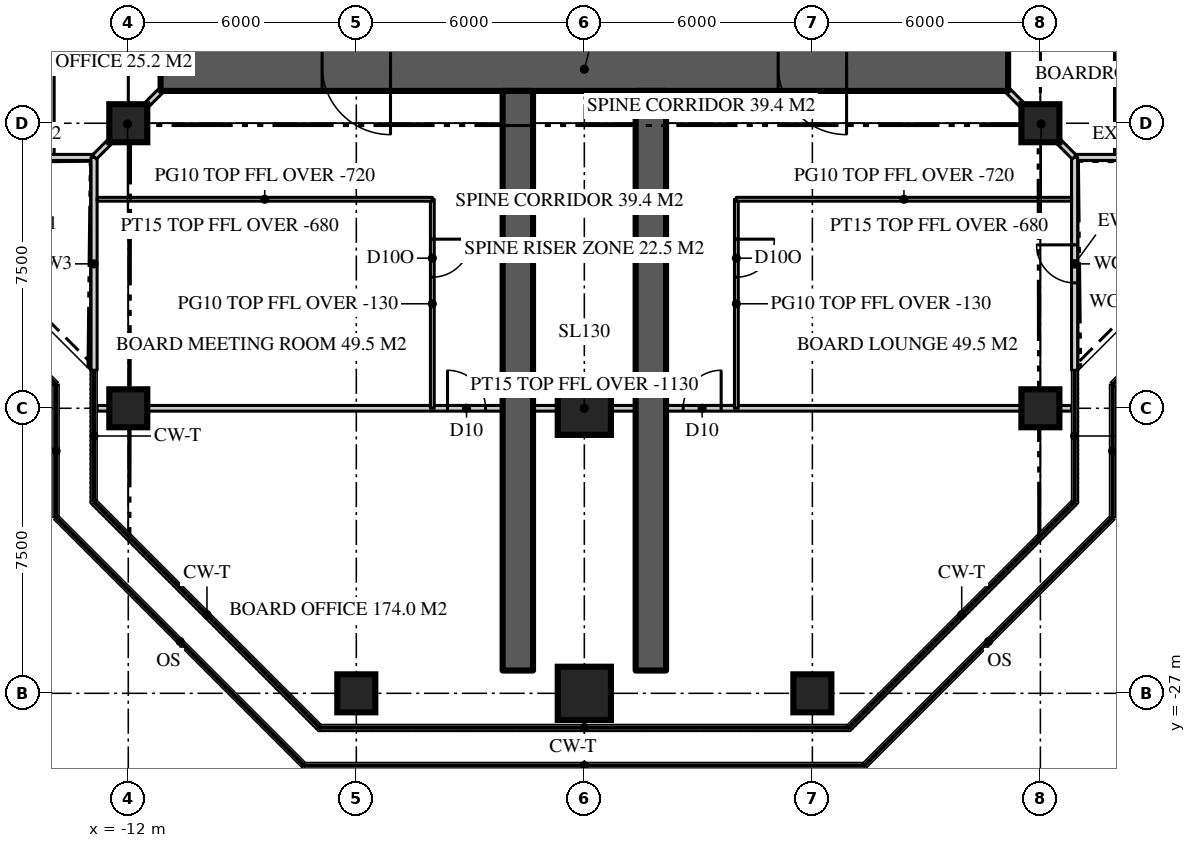
"""IFC4 building model, lengths in metres.
Left out: names, types, materials, properties, quantities, classifications, styles, units other than length and angle.
Written with IfcOpenShell. Run it as: python <this file> out.ifc"""

import sys

from ifc_helpers import new_model, si_unit, direction, frame, frame_2d, origin, origin_2d, place, context, subcontext, project, spatial, rectangle, extrude, element, fill, save


model = new_model("IFC4")
c1 = context("Model", 3, precision=1e-05, world=origin(), true_north=direction((0.0, 1.0)))
c2 = subcontext(c1, "Body", "Model", "MODEL_VIEW")
j1 = project(units=[si_unit("LENGTHUNIT", "METRE"), si_unit("PLANEANGLEUNIT", "RADIAN")], contexts=[c1])
p1 = place(None, origin())
s1 = spatial("IfcSite", under=j1, at=p1, CompositionType="ELEMENT")
p2 = place(p1, origin())
s2 = spatial("IfcBuilding", under=s1, at=p2, CompositionType="ELEMENT")
p3 = place(p2, frame((0.0, 0.0, 294.6)))
s3 = spatial("IfcBuildingStorey", under=s2, at=p3, CompositionType="ELEMENT", Elevation=294.6)
p4 = place(p3, frame((11.15, -10.5, 0.0), z_axis=(0.0, 0.0, 1.0), x_axis=(-1.0, 0.0, 0.0)))
e1 = element("IfcWall", 1, at=p4, inside=s3, PredefinedType="SHEAR", context=c2, shape_type="SweptSolid", body=[
    extrude(rectangle(XDim=22.3, YDim=1.3, at=frame_2d((11.15, 0.0))), origin(), (0.0, 0.0, 1.0), 3.9),
])
p5 = place(p4, frame((16.25, 0.0, 0.0)))
e2 = element("IfcOpeningElement", 2, at=p5, cuts=e1, PredefinedType="OPENING", context=c2, shape_type="SweptSolid", body=[
    extrude(rectangle(XDim=1.8, YDim=2.2, at=frame_2d((0.9, 1.1))), frame((0.0, 0.66, 0.0), z_axis=(0.0, -1.0, 0.0), x_axis=(1.0, 0.0, 0.0)), (0.0, 0.0, 1.0), 1.32),
])
p6 = place(p4, frame((4.25, 0.0, 0.0)))
e3 = element("IfcOpeningElement", 3, at=p6, cuts=e1, PredefinedType="OPENING", context=c2, shape_type="SweptSolid", body=[
    extrude(rectangle(XDim=1.8, YDim=2.2, at=frame_2d((0.9, 1.1))), frame((0.0, 0.66, 0.0), z_axis=(0.0, -1.0, 0.0), x_axis=(1.0, 0.0, 0.0)), (0.0, 0.0, 1.0), 1.32),
])
for number, where, z_axis, x_axis in (
    (4, (-1.75, -11.15, 0.0), (0.0, 0.0, 1.0), (0.0, -1.0, 0.0)),
    (5, (1.75, -11.15, 0.0), (0.0, 0.0, 1.0), (0.0, -1.0, 0.0)),
):
    element("IfcWall", number, at=place(p3, frame(where, z_axis=z_axis, x_axis=x_axis)), inside=s3, PredefinedType="SHEAR", context=c2, shape_type="SweptSolid", body=[
        extrude(rectangle(XDim=15.25, YDim=0.8, at=frame_2d((7.625, 0.0))), origin(), (0.0, 0.0, 1.0), 3.9),
    ])
p7 = place(p3, frame((-6.0, -27.0, 0.0), z_axis=(0.0, 0.0, 1.0), x_axis=(1.0, 0.0, 0.0)))
e6 = element("IfcColumn", 6, at=p7, inside=s3, PredefinedType="COLUMN", context=c2, shape_type="SweptSolid", body=[
    extrude(rectangle(XDim=1.0, YDim=1.0, at=origin_2d()), origin(), (0.0, 0.0, 1.0), 3.9),
])
p8 = place(p3, frame((0.0, -27.0, 0.0), z_axis=(0.0, 0.0, 1.0), x_axis=(1.0, 0.0, 0.0)))
e7 = element("IfcColumn", 7, at=p8, inside=s3, PredefinedType="COLUMN", context=c2, shape_type="SweptSolid", body=[
    extrude(rectangle(XDim=1.4, YDim=1.4, at=origin_2d()), origin(), (0.0, 0.0, 1.0), 3.9),
])
for number, where, z_axis, x_axis in (
    (8, (6.0, -27.0, 0.0), (0.0, 0.0, 1.0), (1.0, 0.0, 0.0)),
    (9, (-12.0, -19.5, 0.0), (0.0, 0.0, 1.0), (1.0, 0.0, 0.0)),
):
    element("IfcColumn", number, at=place(p3, frame(where, z_axis=z_axis, x_axis=x_axis)), inside=s3, PredefinedType="COLUMN", context=c2, shape_type="SweptSolid", body=[
        extrude(rectangle(XDim=1.0, YDim=1.0, at=origin_2d()), origin(), (0.0, 0.0, 1.0), 3.9),
    ])
p9 = place(p3, frame((0.0, -19.5, 0.0), z_axis=(0.0, 0.0, 1.0), x_axis=(1.0, 0.0, 0.0)))
e10 = element("IfcColumn", 10, at=p9, inside=s3, PredefinedType="COLUMN", context=c2, shape_type="SweptSolid", body=[
    extrude(rectangle(XDim=1.4, YDim=1.4, at=origin_2d()), origin(), (0.0, 0.0, 1.0), 3.9),
])
for number, where, z_axis, x_axis in (
    (11, (12.0, -19.5, 0.0), (0.0, 0.0, 1.0), (1.0, 0.0, 0.0)),
    (12, (-12.0, -12.0, 0.0), (0.0, 0.0, 1.0), (1.0, 0.0, 0.0)),
    (13, (12.0, -12.0, 0.0), (0.0, 0.0, 1.0), (1.0, 0.0, 0.0)),
):
    element("IfcColumn", number, at=place(p3, frame(where, z_axis=z_axis, x_axis=x_axis)), inside=s3, PredefinedType="COLUMN", context=c2, shape_type="SweptSolid", body=[
        extrude(rectangle(XDim=1.0, YDim=1.0, at=origin_2d()), origin(), (0.0, 0.0, 1.0), 3.9),
    ])
p10 = place(p3, frame((12.9, -12.9, 0.0), z_axis=(0.0, 0.0, 1.0), x_axis=(1.0, 0.0, 0.0)))
e14 = element("IfcWall", 14, at=p10, inside=s3, PredefinedType="SOLIDWALL", context=c2, shape_type="SweptSolid", body=[
    extrude(rectangle(XDim=5.6, YDim=0.16, at=frame_2d((2.8, 0.0))), origin(), (0.0, 0.0, 1.0), 3.77),
])
p11 = place(p3, frame((-18.5, -12.9, 0.0), z_axis=(0.0, 0.0, 1.0), x_axis=(1.0, 0.0, 0.0)))
e15 = element("IfcWall", 15, at=p11, inside=s3, PredefinedType="SOLIDWALL", context=c2, shape_type="SweptSolid", body=[
    extrude(rectangle(XDim=5.6, YDim=0.16, at=frame_2d((2.8, 0.0))), origin(), (0.0, 0.0, 1.0), 3.77),
])
p12 = place(p11, frame((2.3, 0.0, 0.0)))
e16 = element("IfcOpeningElement", 16, at=p12, cuts=e15, PredefinedType="OPENING", context=c2, shape_type="SweptSolid", body=[
    extrude(rectangle(XDim=1.0, YDim=2.2, at=frame_2d((0.5, 1.1))), frame((0.0, 0.09, 0.0), z_axis=(0.0, -1.0, 0.0), x_axis=(1.0, 0.0, 0.0)), (0.0, 0.0, 1.0), 0.18),
])
p13 = place(p3, frame((-12.9, -12.9, 0.0), z_axis=(0.0, 0.0, 1.0), x_axis=(0.0, -1.0, 0.0)))
e17 = element("IfcWall", 17, at=p13, inside=s3, PredefinedType="SOLIDWALL", context=c2, shape_type="SweptSolid", body=[
    extrude(rectangle(XDim=5.6, YDim=0.16, at=frame_2d((2.8, 0.0))), origin(), (0.0, 0.0, 1.0), 3.77),
])
p14 = place(p3, frame((12.9, -18.5, 0.0), z_axis=(0.0, 0.0, 1.0), x_axis=(0.0, 1.0, 0.0)))
e18 = element("IfcWall", 18, at=p14, inside=s3, PredefinedType="SOLIDWALL", context=c2, shape_type="SweptSolid", body=[
    extrude(rectangle(XDim=5.6, YDim=0.16, at=frame_2d((2.8, 0.0))), origin(), (0.0, 0.0, 1.0), 3.77),
])
p15 = place(p14, frame((2.3, 0.0, 0.0)))
e19 = element("IfcOpeningElement", 19, at=p15, cuts=e18, PredefinedType="OPENING", context=c2, shape_type="SweptSolid", body=[
    extrude(rectangle(XDim=1.0, YDim=2.2, at=frame_2d((0.5, 1.1))), frame((0.0, 0.09, 0.0), z_axis=(0.0, -1.0, 0.0), x_axis=(1.0, 0.0, 0.0)), (0.0, 0.0, 1.0), 0.18),
])
for number, where, z_axis, x_axis in (
    (20, (14.0, -4.0, 0.0), (0.0, 0.0, 1.0), (0.0, -1.0, 0.0)),
    (21, (-14.0, -4.0, 0.0), (0.0, 0.0, 1.0), (0.0, -1.0, 0.0)),
):
    element("IfcWall", number, at=place(p3, frame(where, z_axis=z_axis, x_axis=x_axis)), inside=s3, PredefinedType="PARTITIONING", context=c2, shape_type="SweptSolid", body=[
        extrude(rectangle(XDim=8.82, YDim=0.1, at=frame_2d((4.41, 0.0))), origin(), (0.0, 0.0, 1.0), 3.18),
    ])
p16 = place(p3, frame((-12.82, -19.5, 0.0), z_axis=(0.0, 0.0, 1.0), x_axis=(1.0, 0.0, 0.0)))
e22 = element("IfcWall", 22, at=p16, inside=s3, PredefinedType="PARTITIONING", context=c2, shape_type="SweptSolid", body=[
    extrude(rectangle(XDim=25.64, YDim=0.15, at=frame_2d((12.82, 0.0))), origin(), (0.0, 0.0, 1.0), 2.77),
])
p17 = place(p16, frame((15.42, 0.0, 0.0)))
e23 = element("IfcOpeningElement", 23, at=p17, cuts=e22, PredefinedType="OPENING", context=c2, shape_type="SweptSolid", body=[
    extrude(rectangle(XDim=1.0, YDim=2.2, at=frame_2d((0.5, 1.1))), frame((0.0, 0.085, 0.0), z_axis=(0.0, -1.0, 0.0), x_axis=(1.0, 0.0, 0.0)), (0.0, 0.0, 1.0), 0.17),
])
p18 = place(p16, frame((9.22, 0.0, 0.0)))
e24 = element("IfcOpeningElement", 24, at=p18, cuts=e22, PredefinedType="OPENING", context=c2, shape_type="SweptSolid", body=[
    extrude(rectangle(XDim=1.0, YDim=2.2, at=frame_2d((0.5, 1.1))), frame((0.0, 0.085, 0.0), z_axis=(0.0, -1.0, 0.0), x_axis=(1.0, 0.0, 0.0)), (0.0, 0.0, 1.0), 0.17),
])
p19 = place(p3, frame((4.0, -14.0, 0.0), z_axis=(0.0, 0.0, 1.0), x_axis=(0.0, -1.0, 0.0)))
e25 = element("IfcWall", 25, at=p19, inside=s3, PredefinedType="PARTITIONING", context=c2, shape_type="SweptSolid", body=[
    extrude(rectangle(XDim=5.5, YDim=0.1, at=frame_2d((2.75, 0.0))), origin(), (0.0, 0.0, 1.0), 3.77),
])
p20 = place(p19, frame((1.05, 0.0, 0.0)))
e26 = element("IfcOpeningElement", 26, at=p20, cuts=e25, PredefinedType="OPENING", context=c2, shape_type="SweptSolid", body=[
    extrude(rectangle(XDim=1.0, YDim=2.2, at=frame_2d((0.5, 1.1))), frame((0.0, 0.06, 0.0), z_axis=(0.0, -1.0, 0.0), x_axis=(1.0, 0.0, 0.0)), (0.0, 0.0, 1.0), 0.12),
])
p21 = place(p3, frame((4.0, -14.0, 0.0), z_axis=(0.0, 0.0, 1.0), x_axis=(1.0, 0.0, 0.0)))
e27 = element("IfcWall", 27, at=p21, inside=s3, PredefinedType="PARTITIONING", context=c2, shape_type="SweptSolid", body=[
    extrude(rectangle(XDim=8.82, YDim=0.1, at=frame_2d((4.41, 0.0))), origin(), (0.0, 0.0, 1.0), 3.18),
])
p22 = place(p3, frame((-4.0, -14.0, 0.0), z_axis=(0.0, 0.0, 1.0), x_axis=(0.0, -1.0, 0.0)))
e28 = element("IfcWall", 28, at=p22, inside=s3, PredefinedType="PARTITIONING", context=c2, shape_type="SweptSolid", body=[
    extrude(rectangle(XDim=5.5, YDim=0.1, at=frame_2d((2.75, 0.0))), origin(), (0.0, 0.0, 1.0), 3.77),
])
p23 = place(p22, frame((1.05, 0.0, 0.0)))
e29 = element("IfcOpeningElement", 29, at=p23, cuts=e28, PredefinedType="OPENING", context=c2, shape_type="SweptSolid", body=[
    extrude(rectangle(XDim=1.0, YDim=2.2, at=frame_2d((0.5, 1.1))), frame((0.0, 0.06, 0.0), z_axis=(0.0, -1.0, 0.0), x_axis=(1.0, 0.0, 0.0)), (0.0, 0.0, 1.0), 0.12),
])
p24 = place(p3, frame((-4.0, -14.0, 0.0), z_axis=(0.0, 0.0, 1.0), x_axis=(-1.0, 0.0, 0.0)))
e30 = element("IfcWall", 30, at=p24, inside=s3, PredefinedType="PARTITIONING", context=c2, shape_type="SweptSolid", body=[
    extrude(rectangle(XDim=8.82, YDim=0.1, at=frame_2d((4.41, 0.0))), origin(), (0.0, 0.0, 1.0), 3.18),
])
for number, where, z_axis, x_axis in (
    (31, (-11.15, -11.15, 0.0), (0.0, 0.0, 1.0), (-0.707, -0.707, 0.0)),
    (32, (11.15, -11.15, 0.0), (0.0, 0.0, 1.0), (0.707, -0.707, 0.0)),
):
    element("IfcWall", number, at=place(p3, frame(where, z_axis=z_axis, x_axis=x_axis)), inside=s3, PredefinedType="PARTITIONING", context=c2, shape_type="SweptSolid", body=[
        extrude(rectangle(XDim=2.461, YDim=0.15, at=frame_2d((1.23, 0.0))), origin(), (0.0, 0.0, 1.0), 3.22),
    ])
p25 = place(p15, origin())
e33 = element("IfcDoor", 33, at=p25, inside=s3, OperationType="SINGLE_SWING_RIGHT", PredefinedType="DOOR", context=c2, shape_type="SweptSolid", body=[
    extrude(rectangle(XDim=1.0, YDim=2.2, at=frame_2d((0.5, 1.1))), frame((0.0, 0.025, 0.0), z_axis=(0.0, -1.0, 0.0), x_axis=(1.0, 0.0, 0.0)), (0.0, 0.0, 1.0), 0.05),
])
fill(e19, e33)
p26 = place(p5, origin())
e34 = element("IfcDoor", 34, at=p26, inside=s3, OperationType="DOUBLE_DOOR_DOUBLE_SWING", PredefinedType="DOOR", context=c2, shape_type="SweptSolid", body=[
    extrude(rectangle(XDim=1.8, YDim=2.2, at=frame_2d((0.9, 1.1))), frame((0.0, 0.025, 0.0), z_axis=(0.0, -1.0, 0.0), x_axis=(1.0, 0.0, 0.0)), (0.0, 0.0, 1.0), 0.05),
])
fill(e2, e34)
p27 = place(p6, origin())
e35 = element("IfcDoor", 35, at=p27, inside=s3, OperationType="DOUBLE_DOOR_DOUBLE_SWING", PredefinedType="DOOR", context=c2, shape_type="SweptSolid", body=[
    extrude(rectangle(XDim=1.8, YDim=2.2, at=frame_2d((0.9, 1.1))), frame((0.0, 0.025, 0.0), z_axis=(0.0, -1.0, 0.0), x_axis=(1.0, 0.0, 0.0)), (0.0, 0.0, 1.0), 0.05),
])
fill(e3, e35)
p28 = place(p17, origin())
e36 = element("IfcDoor", 36, at=p28, inside=s3, OperationType="SINGLE_SWING_RIGHT", PredefinedType="DOOR", context=c2, shape_type="SweptSolid", body=[
    extrude(rectangle(XDim=1.0, YDim=2.2, at=frame_2d((0.5, 1.1))), frame((0.0, 0.025, 0.0), z_axis=(0.0, -1.0, 0.0), x_axis=(1.0, 0.0, 0.0)), (0.0, 0.0, 1.0), 0.05),
])
fill(e23, e36)
p29 = place(p18, origin())
e37 = element("IfcDoor", 37, at=p29, inside=s3, OperationType="SINGLE_SWING_LEFT", PredefinedType="DOOR", context=c2, shape_type="SweptSolid", body=[
    extrude(rectangle(XDim=1.0, YDim=2.2, at=frame_2d((0.5, 1.1))), frame((0.0, 0.025, 0.0), z_axis=(0.0, -1.0, 0.0), x_axis=(1.0, 0.0, 0.0)), (0.0, 0.0, 1.0), 0.05),
])
fill(e24, e37)
p30 = place(p20, origin())
e38 = element("IfcDoor", 38, at=p30, inside=s3, OperationType="SINGLE_SWING_LEFT", PredefinedType="DOOR", context=c2, shape_type="SweptSolid", body=[
    extrude(rectangle(XDim=1.0, YDim=2.2, at=frame_2d((0.5, 1.1))), frame((0.0, 0.025, 0.0), z_axis=(0.0, -1.0, 0.0), x_axis=(1.0, 0.0, 0.0)), (0.0, 0.0, 1.0), 0.05),
])
fill(e26, e38)
p31 = place(p23, origin())
e39 = element("IfcDoor", 39, at=p31, inside=s3, OperationType="SINGLE_SWING_LEFT", PredefinedType="DOOR", context=c2, shape_type="SweptSolid", body=[
    extrude(rectangle(XDim=1.0, YDim=2.2, at=frame_2d((0.5, 1.1))), frame((0.0, 0.025, 0.0), z_axis=(0.0, -1.0, 0.0), x_axis=(1.0, 0.0, 0.0)), (0.0, 0.0, 1.0), 0.05),
])
fill(e29, e39)
save(model, sys.argv[1])
